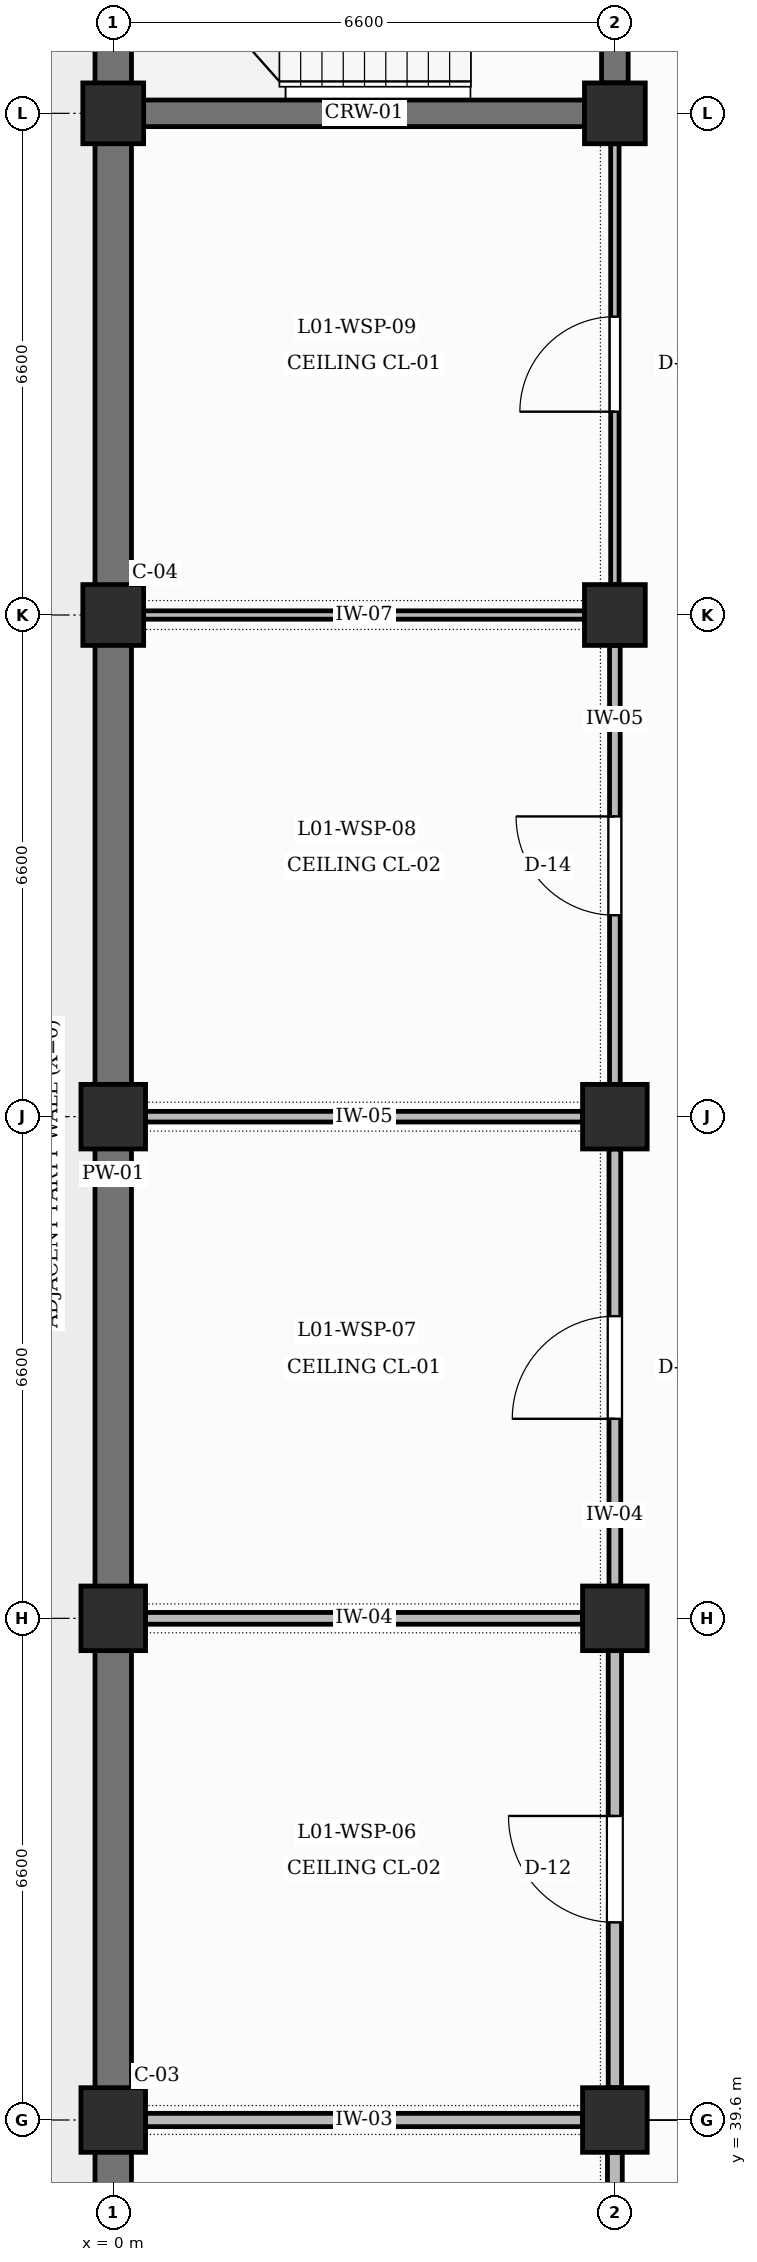
"""IFC4 building model, lengths in metres.
Left out: names, types, materials, properties, quantities, classifications, styles, units other than length and angle.
Written with IfcOpenShell. Run it as: python <this file> out.ifc"""

import sys

from ifc_helpers import new_model, si_unit, direction, frame, frame_2d, origin, origin_2d, place, context, subcontext, project, spatial, rectangle, extrude, element, fill, save


model = new_model("IFC4")
c1 = context("Model", 3, precision=1e-05, world=origin(), true_north=direction((0.0, 1.0)))
c2 = subcontext(c1, "Body", "Model", "MODEL_VIEW")
j1 = project(units=[si_unit("LENGTHUNIT", "METRE"), si_unit("PLANEANGLEUNIT", "RADIAN")], contexts=[c1])
p1 = place(None, origin())
s1 = spatial("IfcSite", under=j1, at=p1, CompositionType="ELEMENT")
p2 = place(p1, origin())
s2 = spatial("IfcBuilding", under=s1, at=p2, CompositionType="ELEMENT")
p3 = place(p2, frame((0.0, 0.0, 5.4)))
s3 = spatial("IfcBuildingStorey", under=s2, at=p3, CompositionType="ELEMENT", Elevation=5.4)
for number, where, z_axis, x_axis in (
    (1, (0.0, 39.6, 0.0), (0.0, 0.0, 1.0), (1.0, 0.0, 0.0)),
    (2, (0.0, 46.2, 0.0), (0.0, 0.0, 1.0), (1.0, 0.0, 0.0)),
    (3, (0.0, 52.8, 0.0), (0.0, 0.0, 1.0), (1.0, 0.0, 0.0)),
):
    element("IfcColumn", number, at=place(p3, frame(where, z_axis=z_axis, x_axis=x_axis)), inside=s3, PredefinedType="COLUMN", context=c2, shape_type="SweptSolid", body=[
        extrude(rectangle(XDim=0.85, YDim=0.85, at=origin_2d()), origin(), (0.0, 0.0, 1.0), 4.8),
    ])
for number, where, z_axis, x_axis in (
    (4, (0.0, 59.4, 0.0), (0.0, 0.0, 1.0), (1.0, 0.0, 0.0)),
    (5, (0.0, 66.0, 0.0), (0.0, 0.0, 1.0), (1.0, 0.0, 0.0)),
):
    element("IfcColumn", number, at=place(p3, frame(where, z_axis=z_axis, x_axis=x_axis)), inside=s3, PredefinedType="COLUMN", context=c2, shape_type="SweptSolid", body=[
        extrude(rectangle(XDim=0.8, YDim=0.8, at=origin_2d()), origin(), (0.0, 0.0, 1.0), 4.8),
    ])
for number, where, z_axis, x_axis in (
    (6, (6.6, 39.6, 0.0), (0.0, 0.0, 1.0), (1.0, 0.0, 0.0)),
    (7, (6.6, 46.2, 0.0), (0.0, 0.0, 1.0), (1.0, 0.0, 0.0)),
    (8, (6.6, 52.8, 0.0), (0.0, 0.0, 1.0), (1.0, 0.0, 0.0)),
):
    element("IfcColumn", number, at=place(p3, frame(where, z_axis=z_axis, x_axis=x_axis)), inside=s3, PredefinedType="COLUMN", context=c2, shape_type="SweptSolid", body=[
        extrude(rectangle(XDim=0.85, YDim=0.85, at=origin_2d()), origin(), (0.0, 0.0, 1.0), 4.8),
    ])
for number, where, z_axis, x_axis in (
    (9, (6.6, 59.4, 0.0), (0.0, 0.0, 1.0), (1.0, 0.0, 0.0)),
    (10, (6.6, 66.0, 0.0), (0.0, 0.0, 1.0), (1.0, 0.0, 0.0)),
):
    element("IfcColumn", number, at=place(p3, frame(where, z_axis=z_axis, x_axis=x_axis)), inside=s3, PredefinedType="COLUMN", context=c2, shape_type="SweptSolid", body=[
        extrude(rectangle(XDim=0.8, YDim=0.8, at=origin_2d()), origin(), (0.0, 0.0, 1.0), 4.8),
    ])
for number, where, z_axis, x_axis in (
    (11, (0.0, 33.425, 0.0), (0.0, 0.0, 1.0), (0.0, 1.0, 0.0)),
    (12, (0.0, 40.025, 0.0), (0.0, 0.0, 1.0), (0.0, 1.0, 0.0)),
    (13, (0.0, 46.625, 0.0), (0.0, 0.0, 1.0), (0.0, 1.0, 0.0)),
):
    element("IfcWall", number, at=place(p3, frame(where, z_axis=z_axis, x_axis=x_axis)), inside=s3, PredefinedType="SOLIDWALL", context=c2, shape_type="SweptSolid", body=[
        extrude(rectangle(XDim=5.75, YDim=0.48, at=frame_2d((2.875, 0.0))), origin(), (0.0, 0.0, 1.0), 3.85),
    ])
p4 = place(p3, frame((0.0, 53.225, 0.0), z_axis=(0.0, 0.0, 1.0), x_axis=(0.0, 1.0, 0.0)))
e14 = element("IfcWall", 14, at=p4, inside=s3, PredefinedType="SOLIDWALL", context=c2, shape_type="SweptSolid", body=[
    extrude(rectangle(XDim=5.775, YDim=0.48, at=frame_2d((2.887, 0.0))), origin(), (0.0, 0.0, 1.0), 3.85),
])
for number, where, z_axis, x_axis in (
    (15, (0.0, 59.8, 0.0), (0.0, 0.0, 1.0), (0.0, 1.0, 0.0)),
    (16, (0.0, 66.4, 0.0), (0.0, 0.0, 1.0), (0.0, 1.0, 0.0)),
):
    element("IfcWall", number, at=place(p3, frame(where, z_axis=z_axis, x_axis=x_axis)), inside=s3, PredefinedType="SOLIDWALL", context=c2, shape_type="SweptSolid", body=[
        extrude(rectangle(XDim=5.8, YDim=0.48, at=frame_2d((2.9, 0.0))), origin(), (0.0, 0.0, 1.0), 3.85),
    ])
p5 = place(p3, frame((0.4, 66.0, 0.0), z_axis=(0.0, 0.0, 1.0), x_axis=(1.0, 0.0, 0.0)))
e17 = element("IfcWall", 17, at=p5, inside=s3, PredefinedType="SHEAR", context=c2, shape_type="SweptSolid", body=[
    extrude(rectangle(XDim=5.8, YDim=0.35, at=frame_2d((2.9, 0.0))), origin(), (0.0, 0.0, 1.0), 3.6),
])
p6 = place(p3, frame((6.6, 66.4, 0.0), z_axis=(0.0, 0.0, 1.0), x_axis=(0.0, 1.0, 0.0)))
e18 = element("IfcWall", 18, at=p6, inside=s3, PredefinedType="SHEAR", context=c2, shape_type="SweptSolid", body=[
    extrude(rectangle(XDim=5.8, YDim=0.35, at=frame_2d((2.9, 0.0))), origin(), (0.0, 0.0, 1.0), 3.7),
])
p7 = place(p6, frame((2.35, 0.0, 0.0)))
e19 = element("IfcOpeningElement", 19, at=p7, cuts=e18, PredefinedType="OPENING", context=c2, shape_type="SweptSolid", body=[
    extrude(rectangle(XDim=1.1, YDim=2.15, at=frame_2d((0.55, 1.075))), frame((0.0, 0.185, 0.0), z_axis=(0.0, -1.0, 0.0), x_axis=(1.0, 0.0, 0.0)), (0.0, 0.0, 1.0), 0.37),
])
p8 = place(p3, frame((6.6, 33.425, 0.0), z_axis=(0.0, 0.0, 1.0), x_axis=(0.0, 1.0, 0.0)))
e20 = element("IfcWall", 20, at=p8, inside=s3, PredefinedType="PARTITIONING", context=c2, shape_type="SweptSolid", body=[
    extrude(rectangle(XDim=5.75, YDim=0.195, at=frame_2d((2.875, 0.0))), origin(), (0.0, 0.0, 1.0), 3.7),
])
p9 = place(p8, frame((2.15, 0.0, 0.0)))
e21 = element("IfcOpeningElement", 21, at=p9, cuts=e20, PredefinedType="OPENING", context=c2, shape_type="SweptSolid", body=[
    extrude(rectangle(XDim=1.45, YDim=2.25, at=frame_2d((0.725, 1.125))), frame((0.0, 0.107, 0.0), z_axis=(0.0, -1.0, 0.0), x_axis=(1.0, 0.0, 0.0)), (0.0, 0.0, 1.0), 0.215),
])
p10 = place(p3, frame((0.425, 39.6, 0.0), z_axis=(0.0, 0.0, 1.0), x_axis=(1.0, 0.0, 0.0)))
e22 = element("IfcWall", 22, at=p10, inside=s3, PredefinedType="PARTITIONING", context=c2, shape_type="SweptSolid", body=[
    extrude(rectangle(XDim=5.75, YDim=0.175, at=frame_2d((2.875, 0.0))), origin(), (0.0, 0.0, 1.0), 3.6),
])
p11 = place(p3, frame((6.6, 40.025, 0.0), z_axis=(0.0, 0.0, 1.0), x_axis=(0.0, 1.0, 0.0)))
e23 = element("IfcWall", 23, at=p11, inside=s3, PredefinedType="PARTITIONING", context=c2, shape_type="SweptSolid", body=[
    extrude(rectangle(XDim=5.75, YDim=0.175, at=frame_2d((2.875, 0.0))), origin(), (0.0, 0.0, 1.0), 3.7),
])
p12 = place(p11, frame((2.175, 0.0, 0.0)))
e24 = element("IfcOpeningElement", 24, at=p12, cuts=e23, PredefinedType="OPENING", context=c2, shape_type="SweptSolid", body=[
    extrude(rectangle(XDim=1.4, YDim=2.25, at=frame_2d((0.7, 1.125))), frame((0.0, 0.097, 0.0), z_axis=(0.0, -1.0, 0.0), x_axis=(1.0, 0.0, 0.0)), (0.0, 0.0, 1.0), 0.195),
])
p13 = place(p3, frame((0.425, 46.2, 0.0), z_axis=(0.0, 0.0, 1.0), x_axis=(1.0, 0.0, 0.0)))
e25 = element("IfcWall", 25, at=p13, inside=s3, PredefinedType="PARTITIONING", context=c2, shape_type="SweptSolid", body=[
    extrude(rectangle(XDim=5.75, YDim=0.155, at=frame_2d((2.875, 0.0))), origin(), (0.0, 0.0, 1.0), 3.7),
])
p14 = place(p3, frame((6.6, 46.625, 0.0), z_axis=(0.0, 0.0, 1.0), x_axis=(0.0, 1.0, 0.0)))
e26 = element("IfcWall", 26, at=p14, inside=s3, PredefinedType="PARTITIONING", context=c2, shape_type="SweptSolid", body=[
    extrude(rectangle(XDim=5.75, YDim=0.155, at=frame_2d((2.875, 0.0))), origin(), (0.0, 0.0, 1.0), 3.7),
])
p15 = place(p14, frame((2.2, 0.0, 0.0)))
e27 = element("IfcOpeningElement", 27, at=p15, cuts=e26, PredefinedType="OPENING", context=c2, shape_type="SweptSolid", body=[
    extrude(rectangle(XDim=1.35, YDim=2.3, at=frame_2d((0.675, 1.15))), frame((0.0, 0.087, 0.0), z_axis=(0.0, -1.0, 0.0), x_axis=(1.0, 0.0, 0.0)), (0.0, 0.0, 1.0), 0.175),
])
p16 = place(p3, frame((0.425, 52.8, 0.0), z_axis=(0.0, 0.0, 1.0), x_axis=(1.0, 0.0, 0.0)))
e28 = element("IfcWall", 28, at=p16, inside=s3, PredefinedType="PARTITIONING", context=c2, shape_type="SweptSolid", body=[
    extrude(rectangle(XDim=5.75, YDim=0.14, at=frame_2d((2.875, 0.0))), origin(), (0.0, 0.0, 1.0), 3.6),
])
p17 = place(p3, frame((6.6, 53.225, 0.0), z_axis=(0.0, 0.0, 1.0), x_axis=(0.0, 1.0, 0.0)))
e29 = element("IfcWall", 29, at=p17, inside=s3, PredefinedType="PARTITIONING", context=c2, shape_type="SweptSolid", body=[
    extrude(rectangle(XDim=5.775, YDim=0.14, at=frame_2d((2.887, 0.0))), origin(), (0.0, 0.0, 1.0), 3.7),
])
p18 = place(p17, frame((2.225, 0.0, 0.0)))
e30 = element("IfcOpeningElement", 30, at=p18, cuts=e29, PredefinedType="OPENING", context=c2, shape_type="SweptSolid", body=[
    extrude(rectangle(XDim=1.3, YDim=2.3, at=frame_2d((0.65, 1.15))), frame((0.0, 0.08, 0.0), z_axis=(0.0, -1.0, 0.0), x_axis=(1.0, 0.0, 0.0)), (0.0, 0.0, 1.0), 0.16),
])
p19 = place(p3, frame((0.4, 59.4, 0.0), z_axis=(0.0, 0.0, 1.0), x_axis=(1.0, 0.0, 0.0)))
e31 = element("IfcWall", 31, at=p19, inside=s3, PredefinedType="PARTITIONING", context=c2, shape_type="SweptSolid", body=[
    extrude(rectangle(XDim=5.8, YDim=0.11, at=frame_2d((2.9, 0.0))), origin(), (0.0, 0.0, 1.0), 3.7),
])
p20 = place(p3, frame((6.6, 59.8, 0.0), z_axis=(0.0, 0.0, 1.0), x_axis=(0.0, 1.0, 0.0)))
e32 = element("IfcWall", 32, at=p20, inside=s3, PredefinedType="PARTITIONING", context=c2, shape_type="SweptSolid", body=[
    extrude(rectangle(XDim=5.8, YDim=0.11, at=frame_2d((2.9, 0.0))), origin(), (0.0, 0.0, 1.0), 3.7),
])
p21 = place(p20, frame((2.275, 0.0, 0.0)))
e33 = element("IfcOpeningElement", 33, at=p21, cuts=e32, PredefinedType="OPENING", context=c2, shape_type="SweptSolid", body=[
    extrude(rectangle(XDim=1.25, YDim=2.25, at=frame_2d((0.625, 1.125))), frame((0.0, 0.065, 0.0), z_axis=(0.0, -1.0, 0.0), x_axis=(1.0, 0.0, 0.0)), (0.0, 0.0, 1.0), 0.13),
])
p22 = place(p12, origin())
e34 = element("IfcDoor", 34, at=p22, inside=s3, OperationType="SINGLE_SWING_RIGHT", PredefinedType="DOOR", context=c2, shape_type="SweptSolid", body=[
    extrude(rectangle(XDim=1.4, YDim=2.25, at=frame_2d((0.7, 1.125))), frame((0.0, 0.025, 0.0), z_axis=(0.0, -1.0, 0.0), x_axis=(1.0, 0.0, 0.0)), (0.0, 0.0, 1.0), 0.05),
])
fill(e24, e34)
p23 = place(p15, origin())
e35 = element("IfcDoor", 35, at=p23, inside=s3, OperationType="SINGLE_SWING_LEFT", PredefinedType="DOOR", context=c2, shape_type="SweptSolid", body=[
    extrude(rectangle(XDim=1.35, YDim=2.3, at=frame_2d((0.675, 1.15))), frame((0.0, 0.025, 0.0), z_axis=(0.0, -1.0, 0.0), x_axis=(1.0, 0.0, 0.0)), (0.0, 0.0, 1.0), 0.05),
])
fill(e27, e35)
p24 = place(p18, origin())
e36 = element("IfcDoor", 36, at=p24, inside=s3, OperationType="SINGLE_SWING_RIGHT", PredefinedType="DOOR", context=c2, shape_type="SweptSolid", body=[
    extrude(rectangle(XDim=1.3, YDim=2.3, at=frame_2d((0.65, 1.15))), frame((0.0, 0.025, 0.0), z_axis=(0.0, -1.0, 0.0), x_axis=(1.0, 0.0, 0.0)), (0.0, 0.0, 1.0), 0.05),
])
fill(e30, e36)
p25 = place(p21, origin())
e37 = element("IfcDoor", 37, at=p25, inside=s3, OperationType="SINGLE_SWING_LEFT", PredefinedType="DOOR", context=c2, shape_type="SweptSolid", body=[
    extrude(rectangle(XDim=1.25, YDim=2.25, at=frame_2d((0.625, 1.125))), frame((0.0, 0.025, 0.0), z_axis=(0.0, -1.0, 0.0), x_axis=(1.0, 0.0, 0.0)), (0.0, 0.0, 1.0), 0.05),
])
fill(e33, e37)
save(model, sys.argv[1])
